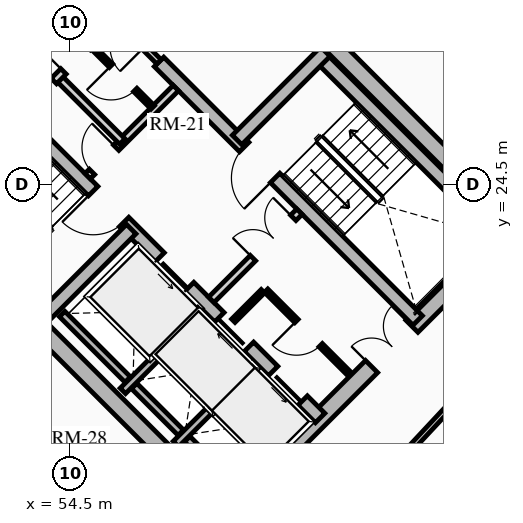
"""IFC4 building model, lengths in metres.
Left out: names, types, materials, properties, quantities, classifications, styles, units other than length and angle.
Written with IfcOpenShell. Run it as: python <this file> out.ifc"""

import sys

from ifc_helpers import new_model, si_unit, direction, frame, frame_2d, origin, place, context, subcontext, project, spatial, rectangle, extrude, source, transform, mapped, element, fill, save


model = new_model("IFC4")
c1 = context("Model", 3, precision=1e-05, world=origin(), true_north=direction((0.0, 1.0)))
c2 = subcontext(c1, "Body", "Model", "MODEL_VIEW")
j1 = project(units=[si_unit("LENGTHUNIT", "METRE"), si_unit("PLANEANGLEUNIT", "RADIAN")], contexts=[c1])
p1 = place(None, origin())
s1 = spatial("IfcSite", under=j1, at=p1, CompositionType="ELEMENT")
p2 = place(p1, origin())
s2 = spatial("IfcBuilding", under=s1, at=p2, CompositionType="ELEMENT")
p3 = place(p2, frame((0.0, 0.0, 144.04)))
s3 = spatial("IfcBuildingStorey", under=s2, at=p3, CompositionType="ELEMENT", Elevation=144.04)
for number, where, z_axis, x_axis in (
    (1, (58.737, 15.697, 0.0), (0.0, 0.0, 1.0), (-0.707, 0.707, 0.0)),
    (2, (66.303, 23.263, 0.0), (0.0, 0.0, 1.0), (-0.707, 0.707, 0.0)),
):
    element("IfcWall", number, at=place(p3, frame(where, z_axis=z_axis, x_axis=x_axis)), inside=s3, PredefinedType="SHEAR", context=c2, shape_type="SweptSolid", body=[
        extrude(rectangle(XDim=14.2, YDim=0.45, at=frame_2d((7.1, 0.0))), origin(), (0.0, 0.0, 1.0), 3.06),
    ])
p4 = place(p3, frame((58.578, 15.856, 0.0), z_axis=(0.0, 0.0, 1.0), x_axis=(0.707106781187, 0.707106781187, 0.0)))
e3 = element("IfcWall", 3, at=p4, inside=s3, PredefinedType="SHEAR", context=c2, shape_type="SweptSolid", body=[
    extrude(rectangle(XDim=10.7, YDim=0.45, at=frame_2d((5.35, 0.0))), origin(), (0.0, 0.0, 1.0), 3.06),
])
m1 = source(origin(), c2, "Body", "SweptSolid", [
    extrude(rectangle(XDim=1.5, YDim=2.02, at=frame_2d((0.75, 1.01))), frame((0.0, 0.235, 0.0), z_axis=(0.0, -1.0, 0.0), x_axis=(1.0, 0.0, 0.0)), (0.0, 0.0, 1.0), 0.47),
])
p5 = place(p4, frame((5.45, 0.0, 0.0)))
e4 = element("IfcOpeningElement", 4, at=p5, cuts=e3, PredefinedType="OPENING", context=c2, shape_type="MappedRepresentation", body=[
    mapped(m1, transform((0.0, 0.0, 0.0), x_axis=(1.0, 0.0, 0.0), y_axis=(0.0, 1.0, 0.0), z_axis=(0.0, 0.0, 1.0), scale=1.0)),
])
p6 = place(p3, frame((48.856, 25.578, 0.0), z_axis=(0.0, 0.0, 1.0), x_axis=(0.707106781187, 0.707106781187, 0.0)))
e5 = element("IfcWall", 5, at=p6, inside=s3, PredefinedType="SHEAR", context=c2, shape_type="SweptSolid", body=[
    extrude(rectangle(XDim=10.7, YDim=0.45, at=frame_2d((5.35, 0.0))), origin(), (0.0, 0.0, 1.0), 3.06),
])
p7 = place(p6, frame((4.6, 0.0, 0.0)))
e6 = element("IfcOpeningElement", 6, at=p7, cuts=e5, PredefinedType="OPENING", context=c2, shape_type="MappedRepresentation", body=[
    mapped(m1, transform((0.0, 0.0, 0.0), x_axis=(1.0, 0.0, 0.0), y_axis=(0.0, 1.0, 0.0), z_axis=(0.0, 0.0, 1.0), scale=1.0)),
])
p8 = place(p3, frame((61.078, 18.355, 0.0), z_axis=(0.0, 0.0, 1.0), x_axis=(-0.707106781187, 0.707106781187, 0.0)))
e7 = element("IfcWall", 7, at=p8, inside=s3, PredefinedType="SHEAR", context=c2, shape_type="SweptSolid", body=[
    extrude(rectangle(XDim=13.75, YDim=0.35, at=frame_2d((6.875, 0.0))), origin(), (0.0, 0.0, 1.0), 3.06),
])
m2 = source(origin(), c2, "Body", "SweptSolid", [
    extrude(rectangle(XDim=1.1, YDim=2.015, at=frame_2d((0.55, 1.007))), frame((0.0, 0.185, 0.0), z_axis=(0.0, -1.0, 0.0), x_axis=(1.0, 0.0, 0.0)), (0.0, 0.0, 1.0), 0.37),
])
p9 = place(p8, frame((4.875, 0.0, 0.0)))
e8 = element("IfcOpeningElement", 8, at=p9, cuts=e7, PredefinedType="OPENING", context=c2, shape_type="MappedRepresentation", body=[
    mapped(m2, transform((0.0, 0.0, 0.0), x_axis=(1.0, 0.0, 0.0), y_axis=(0.0, 1.0, 0.0), z_axis=(0.0, 0.0, 1.0), scale=1.0)),
])
p10 = place(p8, frame((0.65, 0.0, 0.0)))
e9 = element("IfcOpeningElement", 9, at=p10, cuts=e7, PredefinedType="OPENING", context=c2, shape_type="MappedRepresentation", body=[
    mapped(m2, transform((0.0, 0.0, 0.0), x_axis=(1.0, 0.0, 0.0), y_axis=(0.0, 1.0, 0.0), z_axis=(0.0, 0.0, 1.0), scale=1.0)),
])
p11 = place(p8, frame((2.65, 0.0, 0.0)))
e10 = element("IfcOpeningElement", 10, at=p11, cuts=e7, PredefinedType="OPENING", context=c2, shape_type="MappedRepresentation", body=[
    mapped(m2, transform((0.0, 0.0, 0.0), x_axis=(1.0, 0.0, 0.0), y_axis=(0.0, 1.0, 0.0), z_axis=(0.0, 0.0, 1.0), scale=1.0)),
])
m3 = source(origin(), c2, "Body", "SweptSolid", [
    extrude(rectangle(XDim=1.15, YDim=2.02, at=frame_2d((0.575, 1.01))), frame((0.0, 0.185, 0.0), z_axis=(0.0, -1.0, 0.0), x_axis=(1.0, 0.0, 0.0)), (0.0, 0.0, 1.0), 0.37),
])
p12 = place(p8, frame((7.295, 0.0, 0.0)))
e11 = element("IfcOpeningElement", 11, at=p12, cuts=e7, PredefinedType="OPENING", context=c2, shape_type="MappedRepresentation", body=[
    mapped(m3, transform((0.0, 0.0, 0.0), x_axis=(1.0, 0.0, 0.0), y_axis=(0.0, 1.0, 0.0), z_axis=(0.0, 0.0, 1.0), scale=1.0)),
])
p13 = place(p3, frame((63.645, 20.922, 0.0), z_axis=(0.0, 0.0, 1.0), x_axis=(-0.70711946392, 0.707094098226, 0.0)))
e12 = element("IfcWall", 12, at=p13, inside=s3, PredefinedType="SHEAR", context=c2, shape_type="SweptSolid", body=[
    extrude(rectangle(XDim=9.625, YDim=0.35, at=frame_2d((4.812, 0.0))), origin(), (0.0, 0.0, 1.0), 3.06),
])
p14 = place(p13, frame((5.305, 0.0, 0.0)))
e13 = element("IfcOpeningElement", 13, at=p14, cuts=e12, PredefinedType="OPENING", context=c2, shape_type="MappedRepresentation", body=[
    mapped(m3, transform((0.0, 0.0, 0.0), x_axis=(1.0, 0.0, 0.0), y_axis=(0.0, 1.0, 0.0), z_axis=(0.0, 0.0, 1.0), scale=1.0)),
])
p15 = place(p3, frame((53.922, 21.141, 0.0), z_axis=(0.0, 0.0, 1.0), x_axis=(-0.707088616009, 0.707124945897, 0.0)))
e14 = element("IfcWall", 14, at=p15, inside=s3, PredefinedType="SHEAR", context=c2, shape_type="SweptSolid", body=[
    extrude(rectangle(XDim=6.72, YDim=0.35, at=frame_2d((3.36, 0.0))), origin(), (0.0, 0.0, 1.0), 3.06),
])
p16 = place(p3, frame((53.784, 21.003, 0.0), z_axis=(0.0, 0.0, 1.0), x_axis=(0.707106781187, 0.707106781187, 0.0)))
e15 = element("IfcWall", 15, at=p16, inside=s3, PredefinedType="SHEAR", context=c2, shape_type="SweptSolid", body=[
    extrude(rectangle(XDim=3.285, YDim=0.35, at=frame_2d((1.643, 0.0))), origin(), (0.0, 0.0, 1.0), 3.06),
])
p17 = place(p3, frame((65.83, 23.107, 0.0), z_axis=(0.0, 0.0, 1.0), x_axis=(-0.707088616009, 0.707124945897, 0.0)))
e16 = element("IfcWall", 16, at=p17, inside=s3, PredefinedType="SHEAR", context=c2, shape_type="SweptSolid", body=[
    extrude(rectangle(XDim=6.72, YDim=0.35, at=frame_2d((3.36, 0.0))), origin(), (0.0, 0.0, 1.0), 3.06),
])
p18 = place(p3, frame((58.893, 25.674, 0.0), z_axis=(0.0, 0.0, 1.0), x_axis=(0.707106781187, 0.707106781187, 0.0)))
e17 = element("IfcWall", 17, at=p18, inside=s3, PredefinedType="SHEAR", context=c2, shape_type="SweptSolid", body=[
    extrude(rectangle(XDim=3.285, YDim=0.35, at=frame_2d((1.643, 0.0))), origin(), (0.0, 0.0, 1.0), 3.06),
])
p19 = place(p3, frame((55.888, 19.069, 0.0), z_axis=(0.0, 0.0, 1.0), x_axis=(0.707106781187, 0.707106781187, 0.0)))
e18 = element("IfcWall", 18, at=p19, inside=s3, PredefinedType="SHEAR", context=c2, shape_type="SweptSolid", body=[
    extrude(rectangle(XDim=2.97, YDim=0.2, at=frame_2d((1.485, 0.0))), origin(), (0.0, 0.0, 1.0), 3.06),
])
p20 = place(p3, frame((56.015, 19.366, 0.0), z_axis=(0.0, 0.0, 1.0), x_axis=(-0.707106781187, 0.707106781187, 0.0)))
e19 = element("IfcWall", 19, at=p20, inside=s3, PredefinedType="SHEAR", context=c2, shape_type="SweptSolid", body=[
    extrude(rectangle(XDim=2.44, YDim=0.2, at=frame_2d((1.22, 0.0))), origin(), (0.0, 0.0, 1.0), 3.06),
])
p21 = place(p3, frame((57.284, 17.673, 0.0), z_axis=(0.0, 0.0, 1.0), x_axis=(0.707147878904, 0.70706568108, 0.0)))
e20 = element("IfcWall", 20, at=p21, inside=s3, PredefinedType="SHEAR", context=c2, shape_type="SweptSolid", body=[
    extrude(rectangle(XDim=2.97, YDim=0.2, at=frame_2d((1.485, 0.0))), origin(), (0.0, 0.0, 1.0), 3.06),
])
p22 = place(p3, frame((57.412, 17.97, 0.0), z_axis=(0.0, 0.0, 1.0), x_axis=(-0.707106781187, 0.707106781187, 0.0)))
e21 = element("IfcWall", 21, at=p22, inside=s3, PredefinedType="SHEAR", context=c2, shape_type="SweptSolid", body=[
    extrude(rectangle(XDim=1.735, YDim=0.2, at=frame_2d((0.867, 0.0))), origin(), (0.0, 0.0, 1.0), 3.06),
])
p23 = place(p3, frame((58.737, 16.644, 0.0), z_axis=(0.0, 0.0, 1.0), x_axis=(-0.707032117043, 0.707181437447, 0.0)))
e22 = element("IfcWall", 22, at=p23, inside=s3, PredefinedType="SHEAR", context=c2, shape_type="SweptSolid", body=[
    extrude(rectangle(XDim=1.635, YDim=0.2, at=frame_2d((0.817, 0.0))), origin(), (0.0, 0.0, 1.0), 3.06),
])
p24 = place(p3, frame((58.214, 21.467, 0.0), z_axis=(0.0, 0.0, 1.0), x_axis=(0.707106781187, 0.707106781187, 0.0)))
e23 = element("IfcWall", 23, at=p24, inside=s3, PredefinedType="PARTITIONING", context=c2, shape_type="SweptSolid", body=[
    extrude(rectangle(XDim=3.28, YDim=0.2, at=frame_2d((1.64, 0.0))), origin(), (0.0, 0.0, 1.0), 2.705),
])
m4 = source(origin(), c2, "Body", "SweptSolid", [
    extrude(rectangle(XDim=1.5, YDim=2.02, at=frame_2d((0.75, 1.01))), frame((0.0, 0.11, 0.0), z_axis=(0.0, -1.0, 0.0), x_axis=(1.0, 0.0, 0.0)), (0.0, 0.0, 1.0), 0.22),
])
p25 = place(p24, frame((1.55, 0.0, 0.0)))
e24 = element("IfcOpeningElement", 24, at=p25, cuts=e23, PredefinedType="OPENING", context=c2, shape_type="MappedRepresentation", body=[
    mapped(m4, transform((0.0, 0.0, 0.0), x_axis=(1.0, 0.0, 0.0), y_axis=(0.0, 1.0, 0.0), z_axis=(0.0, 0.0, 1.0), scale=1.0)),
])
p26 = place(p3, frame((54.961, 24.719, 0.0), z_axis=(0.0, 0.0, 1.0), x_axis=(0.707106781187, 0.707106781187, 0.0)))
e25 = element("IfcWall", 25, at=p26, inside=s3, PredefinedType="PARTITIONING", context=c2, shape_type="SweptSolid", body=[
    extrude(rectangle(XDim=3.28, YDim=0.2, at=frame_2d((1.64, 0.0))), origin(), (0.0, 0.0, 1.0), 2.705),
])
m5 = source(origin(), c2, "Body", "SweptSolid", [
    extrude(rectangle(XDim=0.9, YDim=2.005, at=frame_2d((0.45, 1.002))), frame((0.0, 0.11, 0.0), z_axis=(0.0, -1.0, 0.0), x_axis=(1.0, 0.0, 0.0)), (0.0, 0.0, 1.0), 0.22),
])
p27 = place(p26, frame((0.16, 0.0, 0.0)))
e26 = element("IfcOpeningElement", 26, at=p27, cuts=e25, PredefinedType="OPENING", context=c2, shape_type="MappedRepresentation", body=[
    mapped(m5, transform((0.0, 0.0, 0.0), x_axis=(1.0, 0.0, 0.0), y_axis=(0.0, 1.0, 0.0), z_axis=(0.0, 0.0, 1.0), scale=1.0)),
])
p28 = place(p3, frame((55.874, 25.631, 0.0), z_axis=(0.0, 0.0, 1.0), x_axis=(-0.707157639372, 0.707055919343, 0.0)))
e27 = element("IfcWall", 27, at=p28, inside=s3, PredefinedType="PARTITIONING", context=c2, shape_type="SweptSolid", body=[
    extrude(rectangle(XDim=2.4, YDim=0.2, at=frame_2d((1.2, 0.0))), origin(), (0.0, 0.0, 1.0), 2.705),
])
p29 = place(p3, frame((53.264, 26.416, 0.0), z_axis=(0.0, 0.0, 1.0), x_axis=(0.707106781187, 0.707106781187, 0.0)))
e28 = element("IfcWall", 28, at=p29, inside=s3, PredefinedType="PARTITIONING", context=c2, shape_type="SweptSolid", body=[
    extrude(rectangle(XDim=3.28, YDim=0.2, at=frame_2d((1.64, 0.0))), origin(), (0.0, 0.0, 1.0), 2.705),
])
m6 = source(origin(), c2, "Body", "SweptSolid", [
    extrude(rectangle(XDim=1.0, YDim=2.015, at=frame_2d((0.5, 1.007))), frame((0.0, 0.11, 0.0), z_axis=(0.0, -1.0, 0.0), x_axis=(1.0, 0.0, 0.0)), (0.0, 0.0, 1.0), 0.22),
])
p30 = place(p29, frame((0.14, 0.0, 0.0)))
e29 = element("IfcOpeningElement", 29, at=p30, cuts=e28, PredefinedType="OPENING", context=c2, shape_type="MappedRepresentation", body=[
    mapped(m6, transform((0.0, 0.0, 0.0), x_axis=(1.0, 0.0, 0.0), y_axis=(0.0, 1.0, 0.0), z_axis=(0.0, 0.0, 1.0), scale=1.0)),
])
p31 = place(p29, frame((1.5, 0.0, 0.0)))
e30 = element("IfcOpeningElement", 30, at=p31, cuts=e28, PredefinedType="OPENING", context=c2, shape_type="MappedRepresentation", body=[
    mapped(m5, transform((0.0, 0.0, 0.0), x_axis=(1.0, 0.0, 0.0), y_axis=(0.0, 1.0, 0.0), z_axis=(0.0, 0.0, 1.0), scale=1.0)),
])
p32 = place(p3, frame((61.835, 19.529, 0.0), z_axis=(0.0, 0.0, 1.0), x_axis=(-0.707146413884, 0.707067146267, 0.0)))
e31 = element("IfcWall", 31, at=p32, inside=s3, PredefinedType="PARTITIONING", context=c2, shape_type="SweptSolid", body=[
    extrude(rectangle(XDim=3.08, YDim=0.125, at=frame_2d((1.54, 0.0))), origin(), (0.0, 0.0, 1.0), 2.705),
])
m7 = source(origin(), c2, "Body", "SweptSolid", [
    extrude(rectangle(XDim=0.9, YDim=2.005, at=frame_2d((0.45, 1.002))), frame((0.0, 0.073, 0.0), z_axis=(0.0, -1.0, 0.0), x_axis=(1.0, 0.0, 0.0)), (0.0, 0.0, 1.0), 0.145),
])
p33 = place(p32, frame((1.05, 0.0, 0.0)))
e32 = element("IfcOpeningElement", 32, at=p33, cuts=e31, PredefinedType="OPENING", context=c2, shape_type="MappedRepresentation", body=[
    mapped(m7, transform((0.0, 0.0, 0.0), x_axis=(1.0, 0.0, 0.0), y_axis=(0.0, 1.0, 0.0), z_axis=(0.0, 0.0, 1.0), scale=1.0)),
])
p34 = place(p3, frame((58.794, 20.915, 0.0), z_axis=(0.0, 0.0, 1.0), x_axis=(0.707106781187, 0.707106781187, 0.0)))
e33 = element("IfcWall", 33, at=p34, inside=s3, PredefinedType="PARTITIONING", context=c2, shape_type="SweptSolid", body=[
    extrude(rectangle(XDim=1.1, YDim=0.125, at=frame_2d((0.55, 0.0))), origin(), (0.0, 0.0, 1.0), 2.705),
])
p35 = place(p3, frame((56.673, 26.529, 0.0), z_axis=(0.0, 0.0, 1.0), x_axis=(-0.707052764397, 0.70716079385, 0.0)))
e34 = element("IfcWall", 34, at=p35, inside=s3, PredefinedType="PARTITIONING", context=c2, shape_type="SweptSolid", body=[
    extrude(rectangle(XDim=2.26, YDim=0.125, at=frame_2d((1.13, 0.0))), origin(), (0.0, 0.0, 1.0), 2.705),
])
p36 = place(p35, frame((0.65, 0.0, 0.0)))
e35 = element("IfcOpeningElement", 35, at=p36, cuts=e34, PredefinedType="OPENING", context=c2, shape_type="MappedRepresentation", body=[
    mapped(m7, transform((0.0, 0.0, 0.0), x_axis=(1.0, 0.0, 0.0), y_axis=(0.0, 1.0, 0.0), z_axis=(0.0, 0.0, 1.0), scale=1.0)),
])
p37 = place(p3, frame((56.839, 27.728, 0.0), z_axis=(0.0, 0.0, 1.0), x_axis=(-0.707106781187, 0.707106781187, 0.0)))
e36 = element("IfcWall", 36, at=p37, inside=s3, PredefinedType="PARTITIONING", context=c2, shape_type="SweptSolid", body=[
    extrude(rectangle(XDim=3.9, YDim=0.16, at=frame_2d((1.95, 0.0))), origin(), (0.0, 0.0, 1.0), 2.705),
])
m8 = source(origin(), c2, "Body", "SweptSolid", [
    extrude(rectangle(XDim=0.9, YDim=2.005, at=frame_2d((0.45, 1.002))), frame((0.0, 0.09, 0.0), z_axis=(0.0, -1.0, 0.0), x_axis=(1.0, 0.0, 0.0)), (0.0, 0.0, 1.0), 0.18),
])
p38 = place(p37, frame((0.55, 0.0, 0.0)))
e37 = element("IfcOpeningElement", 37, at=p38, cuts=e36, PredefinedType="OPENING", context=c2, shape_type="MappedRepresentation", body=[
    mapped(m8, transform((0.0, 0.0, 0.0), x_axis=(1.0, 0.0, 0.0), y_axis=(0.0, 1.0, 0.0), z_axis=(0.0, 0.0, 1.0), scale=1.0)),
])
p39 = place(p37, frame((2.35, 0.0, 0.0)))
e38 = element("IfcOpeningElement", 38, at=p39, cuts=e36, PredefinedType="OPENING", context=c2, shape_type="MappedRepresentation", body=[
    mapped(m8, transform((0.0, 0.0, 0.0), x_axis=(1.0, 0.0, 0.0), y_axis=(0.0, 1.0, 0.0), z_axis=(0.0, 0.0, 1.0), scale=1.0)),
])
p40 = place(p3, frame((52.02, 19.02, 0.0), z_axis=(0.0, 0.0, 1.0), x_axis=(0.699456449804, -0.71467522332, 0.0)))
e39 = element("IfcWall", 39, at=p40, inside=s3, PredefinedType="PARTITIONING", context=c2, shape_type="SweptSolid", body=[
    extrude(rectangle(XDim=6.032, YDim=0.15, at=frame_2d((3.016, 0.0))), origin(), (0.0, 0.0, 1.0), 2.275),
])
p41 = place(p3, frame((62.784, 16.83, 0.0), z_axis=(0.0, 0.0, 1.0), x_axis=(0.682240832942, 0.731127516831, 0.0)))
e40 = element("IfcWall", 40, at=p41, inside=s3, PredefinedType="PARTITIONING", context=c2, shape_type="SweptSolid", body=[
    extrude(rectangle(XDim=6.517, YDim=0.15, at=frame_2d((3.259, 0.0))), origin(), (0.0, 0.0, 1.0), 2.275),
])
m9 = source(origin(), c2, "Body", "SweptSolid", [
    extrude(rectangle(XDim=1.1, YDim=2.015, at=frame_2d((0.55, 1.007))), frame((0.0, 0.025, 0.0), z_axis=(0.0, -1.0, 0.0), x_axis=(1.0, 0.0, 0.0)), (0.0, 0.0, 1.0), 0.05),
])
p42 = place(p9, origin())
e41 = element("IfcDoor", 41, at=p42, inside=s3, OperationType="SLIDING_TO_LEFT", PredefinedType="DOOR", context=c2, shape_type="MappedRepresentation", body=[
    mapped(m9, transform((0.0, 0.0, 0.0), x_axis=(1.0, 0.0, 0.0), y_axis=(0.0, 1.0, 0.0), z_axis=(0.0, 0.0, 1.0), scale=1.0)),
])
fill(e8, e41)
p43 = place(p10, origin())
e42 = element("IfcDoor", 42, at=p43, inside=s3, OperationType="SLIDING_TO_LEFT", PredefinedType="DOOR", context=c2, shape_type="MappedRepresentation", body=[
    mapped(m9, transform((0.0, 0.0, 0.0), x_axis=(1.0, 0.0, 0.0), y_axis=(0.0, 1.0, 0.0), z_axis=(0.0, 0.0, 1.0), scale=1.0)),
])
fill(e9, e42)
p44 = place(p11, origin())
e43 = element("IfcDoor", 43, at=p44, inside=s3, OperationType="SLIDING_TO_RIGHT", PredefinedType="DOOR", context=c2, shape_type="MappedRepresentation", body=[
    mapped(m9, transform((0.0, 0.0, 0.0), x_axis=(1.0, 0.0, 0.0), y_axis=(0.0, 1.0, 0.0), z_axis=(0.0, 0.0, 1.0), scale=1.0)),
])
fill(e10, e43)
m10 = source(origin(), c2, "Body", "SweptSolid", [
    extrude(rectangle(XDim=1.15, YDim=2.02, at=frame_2d((0.575, 1.01))), frame((0.0, 0.025, 0.0), z_axis=(0.0, -1.0, 0.0), x_axis=(1.0, 0.0, 0.0)), (0.0, 0.0, 1.0), 0.05),
])
p45 = place(p12, origin())
e44 = element("IfcDoor", 44, at=p45, inside=s3, OperationType="SINGLE_SWING_RIGHT", PredefinedType="DOOR", context=c2, shape_type="MappedRepresentation", body=[
    mapped(m10, transform((0.0, 0.0, 0.0), x_axis=(1.0, 0.0, 0.0), y_axis=(0.0, 1.0, 0.0), z_axis=(0.0, 0.0, 1.0), scale=1.0)),
])
fill(e11, e44)
p46 = place(p14, origin())
e45 = element("IfcDoor", 45, at=p46, inside=s3, OperationType="SINGLE_SWING_LEFT", PredefinedType="DOOR", context=c2, shape_type="MappedRepresentation", body=[
    mapped(m10, transform((0.0, 0.0, 0.0), x_axis=(1.0, 0.0, 0.0), y_axis=(0.0, 1.0, 0.0), z_axis=(0.0, 0.0, 1.0), scale=1.0)),
])
fill(e13, e45)
m11 = source(origin(), c2, "Body", "SweptSolid", [
    extrude(rectangle(XDim=1.5, YDim=2.02, at=frame_2d((0.75, 1.01))), frame((0.0, 0.025, 0.0), z_axis=(0.0, -1.0, 0.0), x_axis=(1.0, 0.0, 0.0)), (0.0, 0.0, 1.0), 0.05),
])
p47 = place(p5, origin())
e46 = element("IfcDoor", 46, at=p47, inside=s3, OperationType="DOUBLE_DOOR_SINGLE_SWING", PredefinedType="DOOR", context=c2, shape_type="MappedRepresentation", body=[
    mapped(m11, transform((0.0, 0.0, 0.0), x_axis=(1.0, 0.0, 0.0), y_axis=(0.0, 1.0, 0.0), z_axis=(0.0, 0.0, 1.0), scale=1.0)),
])
fill(e4, e46)
p48 = place(p25, origin())
e47 = element("IfcDoor", 47, at=p48, inside=s3, OperationType="DOUBLE_DOOR_SINGLE_SWING", PredefinedType="DOOR", context=c2, shape_type="MappedRepresentation", body=[
    mapped(m11, transform((0.0, 0.0, 0.0), x_axis=(1.0, 0.0, 0.0), y_axis=(0.0, 1.0, 0.0), z_axis=(0.0, 0.0, 1.0), scale=1.0)),
])
fill(e24, e47)
m12 = source(origin(), c2, "Body", "SweptSolid", [
    extrude(rectangle(XDim=0.9, YDim=2.005, at=frame_2d((0.45, 1.002))), frame((0.0, 0.025, 0.0), z_axis=(0.0, -1.0, 0.0), x_axis=(1.0, 0.0, 0.0)), (0.0, 0.0, 1.0), 0.05),
])
p49 = place(p27, origin())
e48 = element("IfcDoor", 48, at=p49, inside=s3, OperationType="SINGLE_SWING_RIGHT", PredefinedType="DOOR", context=c2, shape_type="MappedRepresentation", body=[
    mapped(m12, transform((0.0, 0.0, 0.0), x_axis=(1.0, 0.0, 0.0), y_axis=(0.0, 1.0, 0.0), z_axis=(0.0, 0.0, 1.0), scale=1.0)),
])
fill(e26, e48)
m13 = source(origin(), c2, "Body", "SweptSolid", [
    extrude(rectangle(XDim=1.0, YDim=2.015, at=frame_2d((0.5, 1.007))), frame((0.0, 0.025, 0.0), z_axis=(0.0, -1.0, 0.0), x_axis=(1.0, 0.0, 0.0)), (0.0, 0.0, 1.0), 0.05),
])
p50 = place(p30, origin())
e49 = element("IfcDoor", 49, at=p50, inside=s3, OperationType="SINGLE_SWING_LEFT", PredefinedType="DOOR", context=c2, shape_type="MappedRepresentation", body=[
    mapped(m13, transform((0.0, 0.0, 0.0), x_axis=(1.0, 0.0, 0.0), y_axis=(0.0, 1.0, 0.0), z_axis=(0.0, 0.0, 1.0), scale=1.0)),
])
fill(e29, e49)
p51 = place(p33, origin())
e50 = element("IfcDoor", 50, at=p51, inside=s3, OperationType="SINGLE_SWING_RIGHT", PredefinedType="DOOR", context=c2, shape_type="MappedRepresentation", body=[
    mapped(m12, transform((0.0, 0.0, 0.0), x_axis=(1.0, 0.0, 0.0), y_axis=(0.0, 1.0, 0.0), z_axis=(0.0, 0.0, 1.0), scale=1.0)),
])
fill(e32, e50)
p52 = place(p31, origin())
e51 = element("IfcDoor", 51, at=p52, inside=s3, OperationType="SINGLE_SWING_LEFT", PredefinedType="DOOR", context=c2, shape_type="MappedRepresentation", body=[
    mapped(m12, transform((0.0, 0.0, 0.0), x_axis=(1.0, 0.0, 0.0), y_axis=(0.0, 1.0, 0.0), z_axis=(0.0, 0.0, 1.0), scale=1.0)),
])
fill(e30, e51)
p53 = place(p36, origin())
e52 = element("IfcDoor", 52, at=p53, inside=s3, OperationType="SINGLE_SWING_RIGHT", PredefinedType="DOOR", context=c2, shape_type="MappedRepresentation", body=[
    mapped(m12, transform((0.0, 0.0, 0.0), x_axis=(1.0, 0.0, 0.0), y_axis=(0.0, 1.0, 0.0), z_axis=(0.0, 0.0, 1.0), scale=1.0)),
])
fill(e35, e52)
save(model, sys.argv[1])
